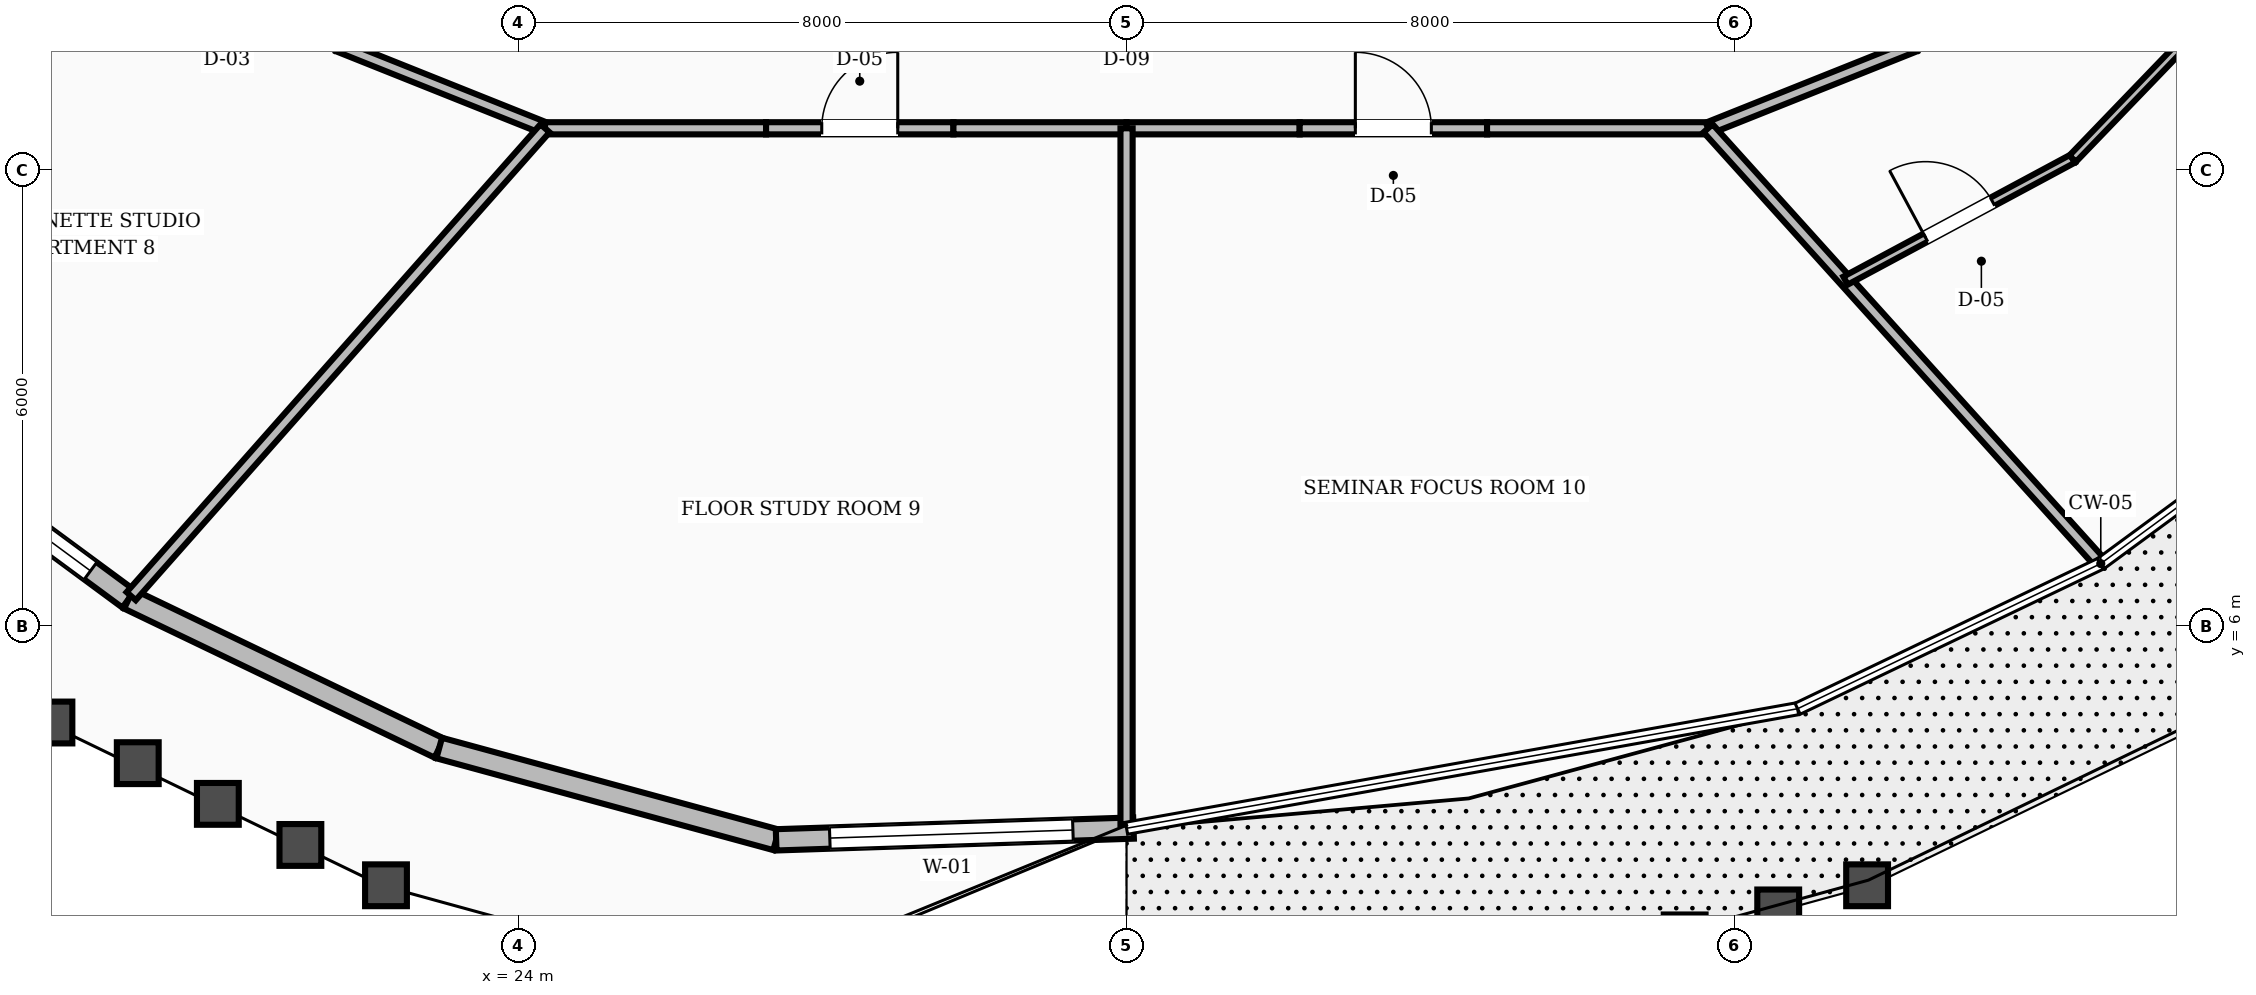
"""IFC4 building model, lengths in metres.
Left out: names, types, materials, properties, quantities, classifications, styles, units other than length and angle.
Written with IfcOpenShell. Run it as: python <this file> out.ifc"""

import sys

from ifc_helpers import new_model, si_unit, direction, frame, frame_2d, origin, place, context, subcontext, project, spatial, rectangle, extrude, element, fill, save


model = new_model("IFC4")
c1 = context("Model", 3, precision=1e-05, world=origin(), true_north=direction((0.0, 1.0)))
c2 = subcontext(c1, "Body", "Model", "MODEL_VIEW")
j1 = project(units=[si_unit("LENGTHUNIT", "METRE"), si_unit("PLANEANGLEUNIT", "RADIAN")], contexts=[c1])
p1 = place(None, origin())
s1 = spatial("IfcSite", under=j1, at=p1, CompositionType="ELEMENT")
p2 = place(p1, origin())
s2 = spatial("IfcBuilding", under=s1, at=p2, CompositionType="ELEMENT")
p3 = place(p2, frame((0.0, 0.0, 214.8)))
s3 = spatial("IfcBuildingStorey", under=s2, at=p3, CompositionType="ELEMENT", Elevation=214.8)
p4 = place(p3, frame((15.291, 8.996, 0.0), z_axis=(0.0, 0.0, 1.0), x_axis=(0.8050103103, -0.593260819801, 0.0)))
e1 = element("IfcWall", 1, at=p4, inside=s3, PredefinedType="STANDARD", context=c2, shape_type="SweptSolid", body=[
    extrude(rectangle(XDim=4.448, YDim=0.28, at=frame_2d((2.224, 0.0))), origin(), (0.0, 0.0, 1.0), 2.88),
])
p5 = place(p4, frame((0.624, 0.0, 0.8)))
e2 = element("IfcOpeningElement", 2, at=p5, cuts=e1, PredefinedType="OPENING", context=c2, shape_type="SweptSolid", body=[
    extrude(rectangle(XDim=3.2, YDim=1.65, at=frame_2d((1.6, 0.825))), frame((0.0, 0.15, 0.0), z_axis=(0.0, -1.0, 0.0), x_axis=(1.0, 0.0, 0.0)), (0.0, 0.0, 1.0), 0.3),
])
p6 = place(p3, frame((18.872, 6.357, 0.0), z_axis=(0.0, 0.0, 1.0), x_axis=(0.90155079899, -0.432673267999, 0.0)))
e3 = element("IfcWall", 3, at=p6, inside=s3, PredefinedType="STANDARD", context=c2, shape_type="SweptSolid", body=[
    extrude(rectangle(XDim=4.531, YDim=0.28, at=frame_2d((2.266, 0.0))), origin(), (0.0, 0.0, 1.0), 2.88),
])
p7 = place(p3, frame((22.957, 4.396, 0.0), z_axis=(0.0, 0.0, 1.0), x_axis=(0.964839814396, -0.26283860553, 0.0)))
e4 = element("IfcWall", 4, at=p7, inside=s3, PredefinedType="STANDARD", context=c2, shape_type="SweptSolid", body=[
    extrude(rectangle(XDim=4.594, YDim=0.28, at=frame_2d((2.297, 0.0))), origin(), (0.0, 0.0, 1.0), 2.88),
])
p8 = place(p3, frame((27.39, 3.189, 0.0), z_axis=(0.0, 0.0, 1.0), x_axis=(0.9994551691, 0.033005529236, 0.0)))
e5 = element("IfcWall", 5, at=p8, inside=s3, PredefinedType="STANDARD", context=c2, shape_type="SweptSolid", body=[
    extrude(rectangle(XDim=4.704, YDim=0.28, at=frame_2d((2.352, 0.0))), origin(), (0.0, 0.0, 1.0), 2.88),
])
p9 = place(p8, frame((0.706, 0.0, 0.8)))
e6 = element("IfcOpeningElement", 6, at=p9, cuts=e5, PredefinedType="OPENING", context=c2, shape_type="SweptSolid", body=[
    extrude(rectangle(XDim=3.2, YDim=1.65, at=frame_2d((1.6, 0.825))), frame((0.0, 0.15, 0.0), z_axis=(0.0, -1.0, 0.0), x_axis=(1.0, 0.0, 0.0)), (0.0, 0.0, 1.0), 0.3),
])
p10 = place(p3, frame((21.635, 13.635, 0.0), z_axis=(0.0, 0.0, 1.0), x_axis=(0.92856882165, -0.371160266542, 0.0)))
e7 = element("IfcWall", 7, at=p10, inside=s3, PredefinedType="SOLIDWALL", context=c2, shape_type="SweptSolid", body=[
    extrude(rectangle(XDim=2.923, YDim=0.16, at=frame_2d((1.461, 0.0))), origin(), (0.0, 0.0, 1.0), 2.87),
])
p11 = place(p3, frame((24.349, 12.55, 0.0), z_axis=(0.0, 0.0, 1.0), x_axis=(1.0, 0.0, 0.0)))
e8 = element("IfcWall", 8, at=p11, inside=s3, PredefinedType="SOLIDWALL", context=c2, shape_type="SweptSolid", body=[
    extrude(rectangle(XDim=2.908, YDim=0.16, at=frame_2d((1.454, 0.0))), origin(), (0.0, 0.0, 1.0), 2.87),
])
p12 = place(p3, frame((27.257, 12.55, 0.0), z_axis=(0.0, 0.0, 1.0), x_axis=(1.0, 0.0, 0.0)))
e9 = element("IfcWall", 9, at=p12, inside=s3, PredefinedType="SOLIDWALL", context=c2, shape_type="SweptSolid", body=[
    extrude(rectangle(XDim=2.465, YDim=0.16, at=frame_2d((1.232, 0.0))), origin(), (0.0, 0.0, 1.0), 2.87),
])
p13 = place(p12, frame((0.733, 0.0, 0.0)))
e10 = element("IfcOpeningElement", 10, at=p13, cuts=e9, PredefinedType="OPENING", context=c2, shape_type="SweptSolid", body=[
    extrude(rectangle(XDim=1.0, YDim=2.1, at=frame_2d((0.5, 1.05))), frame((0.0, 0.09, 0.0), z_axis=(0.0, -1.0, 0.0), x_axis=(1.0, 0.0, 0.0)), (0.0, 0.0, 1.0), 0.18),
])
for number, where, z_axis, x_axis in (
    (11, (29.722, 12.55, 0.0), (0.0, 0.0, 1.0), (1.0, 0.0, 0.0)),
    (12, (32.0, 12.55, 0.0), (0.0, 0.0, 1.0), (1.0, 0.0, 0.0)),
):
    element("IfcWall", number, at=place(p3, frame(where, z_axis=z_axis, x_axis=x_axis)), inside=s3, PredefinedType="SOLIDWALL", context=c2, shape_type="SweptSolid", body=[
        extrude(rectangle(XDim=2.278, YDim=0.16, at=frame_2d((1.139, 0.0))), origin(), (0.0, 0.0, 1.0), 2.87),
    ])
p14 = place(p3, frame((34.278, 12.55, 0.0), z_axis=(0.0, 0.0, 1.0), x_axis=(1.0, 0.0, 0.0)))
e13 = element("IfcWall", 13, at=p14, inside=s3, PredefinedType="SOLIDWALL", context=c2, shape_type="SweptSolid", body=[
    extrude(rectangle(XDim=2.465, YDim=0.16, at=frame_2d((1.232, 0.0))), origin(), (0.0, 0.0, 1.0), 2.87),
])
p15 = place(p14, frame((0.733, 0.0, 0.0)))
e14 = element("IfcOpeningElement", 14, at=p15, cuts=e13, PredefinedType="OPENING", context=c2, shape_type="SweptSolid", body=[
    extrude(rectangle(XDim=1.0, YDim=2.1, at=frame_2d((0.5, 1.05))), frame((0.0, 0.09, 0.0), z_axis=(0.0, -1.0, 0.0), x_axis=(1.0, 0.0, 0.0)), (0.0, 0.0, 1.0), 0.18),
])
p16 = place(p3, frame((36.743, 12.55, 0.0), z_axis=(0.0, 0.0, 1.0), x_axis=(1.0, 0.0, 0.0)))
e15 = element("IfcWall", 15, at=p16, inside=s3, PredefinedType="SOLIDWALL", context=c2, shape_type="SweptSolid", body=[
    extrude(rectangle(XDim=2.908, YDim=0.16, at=frame_2d((1.454, 0.0))), origin(), (0.0, 0.0, 1.0), 2.87),
])
p17 = place(p3, frame((39.651, 12.55, 0.0), z_axis=(0.0, 0.0, 1.0), x_axis=(0.92856882165, 0.371160266542, 0.0)))
e16 = element("IfcWall", 16, at=p17, inside=s3, PredefinedType="SOLIDWALL", context=c2, shape_type="SweptSolid", body=[
    extrude(rectangle(XDim=2.923, YDim=0.16, at=frame_2d((1.461, 0.0))), origin(), (0.0, 0.0, 1.0), 2.87),
])
p18 = place(p3, frame((39.651, 12.55, 0.0), z_axis=(0.0, 0.0, 1.0), x_axis=(0.669803904272, -0.742538032576, 0.0)))
e17 = element("IfcWall", 17, at=p18, inside=s3, PredefinedType="SOLIDWALL", context=c2, shape_type="SweptSolid", body=[
    extrude(rectangle(XDim=7.663, YDim=0.16, at=frame_2d((3.832, 0.0))), origin(), (0.0, 0.0, 1.0), 2.87),
])
p19 = place(p3, frame((41.459, 10.545, 0.0), z_axis=(0.0, 0.0, 1.0), x_axis=(0.881018320822, 0.473082147597, 0.0)))
e18 = element("IfcWall", 18, at=p19, inside=s3, PredefinedType="PARTITIONING", context=c2, shape_type="SweptSolid", body=[
    extrude(rectangle(XDim=3.392, YDim=0.12, at=frame_2d((1.696, 0.0))), origin(), (0.0, 0.0, 1.0), 2.87),
])
p20 = place(p19, frame((1.196, 0.0, 0.0)))
e19 = element("IfcOpeningElement", 19, at=p20, cuts=e18, PredefinedType="OPENING", context=c2, shape_type="SweptSolid", body=[
    extrude(rectangle(XDim=1.0, YDim=2.1, at=frame_2d((0.5, 1.05))), frame((0.0, 0.07, 0.0), z_axis=(0.0, -1.0, 0.0), x_axis=(1.0, 0.0, 0.0)), (0.0, 0.0, 1.0), 0.14),
])
p21 = place(p3, frame((44.447, 12.15, 0.0), z_axis=(0.0, 0.0, 1.0), x_axis=(0.693436261911, 0.720517973868, 0.0)))
e20 = element("IfcWall", 20, at=p21, inside=s3, PredefinedType="PARTITIONING", context=c2, shape_type="SweptSolid", body=[
    extrude(rectangle(XDim=3.381, YDim=0.12, at=frame_2d((1.69, 0.0))), origin(), (0.0, 0.0, 1.0), 2.87),
])
p22 = place(p3, frame((24.349, 12.55, 0.0), z_axis=(0.0, 0.0, 1.0), x_axis=(-0.662525161909, -0.749039658388, 0.0)))
e21 = element("IfcWall", 21, at=p22, inside=s3, PredefinedType="SOLIDWALL", context=c2, shape_type="SweptSolid", body=[
    extrude(rectangle(XDim=8.218, YDim=0.16, at=frame_2d((4.109, 0.0))), origin(), (0.0, 0.0, 1.0), 2.87),
])
p23 = place(p3, frame((32.0, 12.55, 0.0), z_axis=(0.0, 0.0, 1.0), x_axis=(0.0, -1.0, 0.0)))
e22 = element("IfcWall", 22, at=p23, inside=s3, PredefinedType="SOLIDWALL", context=c2, shape_type="SweptSolid", body=[
    extrude(rectangle(XDim=9.159, YDim=0.16, at=frame_2d((4.58, 0.0))), origin(), (0.0, 0.0, 1.0), 2.87),
])
p24 = place(p5, origin())
e23 = element("IfcWindow", 23, at=p24, inside=s3, PartitioningType="SINGLE_PANEL", PredefinedType="WINDOW", context=c2, shape_type="SweptSolid", body=[
    extrude(rectangle(XDim=3.2, YDim=1.65, at=frame_2d((1.6, 0.825))), frame((0.0, 0.03, 0.0), z_axis=(0.0, -1.0, 0.0), x_axis=(1.0, 0.0, 0.0)), (0.0, 0.0, 1.0), 0.06),
])
fill(e2, e23)
p25 = place(p9, origin())
e24 = element("IfcWindow", 24, at=p25, inside=s3, PartitioningType="SINGLE_PANEL", PredefinedType="WINDOW", context=c2, shape_type="SweptSolid", body=[
    extrude(rectangle(XDim=3.2, YDim=1.65, at=frame_2d((1.6, 0.825))), frame((0.0, 0.03, 0.0), z_axis=(0.0, -1.0, 0.0), x_axis=(1.0, 0.0, 0.0)), (0.0, 0.0, 1.0), 0.06),
])
fill(e6, e24)
p26 = place(p20, origin())
e25 = element("IfcDoor", 25, at=p26, inside=s3, OperationType="SINGLE_SWING_LEFT", PredefinedType="DOOR", context=c2, shape_type="SweptSolid", body=[
    extrude(rectangle(XDim=1.0, YDim=2.1, at=frame_2d((0.5, 1.05))), frame((0.0, 0.025, 0.0), z_axis=(0.0, -1.0, 0.0), x_axis=(1.0, 0.0, 0.0)), (0.0, 0.0, 1.0), 0.05),
])
fill(e19, e25)
p27 = place(p13, origin())
e26 = element("IfcDoor", 26, at=p27, inside=s3, OperationType="SINGLE_SWING_RIGHT", PredefinedType="DOOR", context=c2, shape_type="SweptSolid", body=[
    extrude(rectangle(XDim=1.0, YDim=2.1, at=frame_2d((0.5, 1.05))), frame((0.0, 0.025, 0.0), z_axis=(0.0, -1.0, 0.0), x_axis=(1.0, 0.0, 0.0)), (0.0, 0.0, 1.0), 0.05),
])
fill(e10, e26)
p28 = place(p15, origin())
e27 = element("IfcDoor", 27, at=p28, inside=s3, OperationType="SINGLE_SWING_LEFT", PredefinedType="DOOR", context=c2, shape_type="SweptSolid", body=[
    extrude(rectangle(XDim=1.0, YDim=2.1, at=frame_2d((0.5, 1.05))), frame((0.0, 0.025, 0.0), z_axis=(0.0, -1.0, 0.0), x_axis=(1.0, 0.0, 0.0)), (0.0, 0.0, 1.0), 0.05),
])
fill(e14, e27)
save(model, sys.argv[1])
